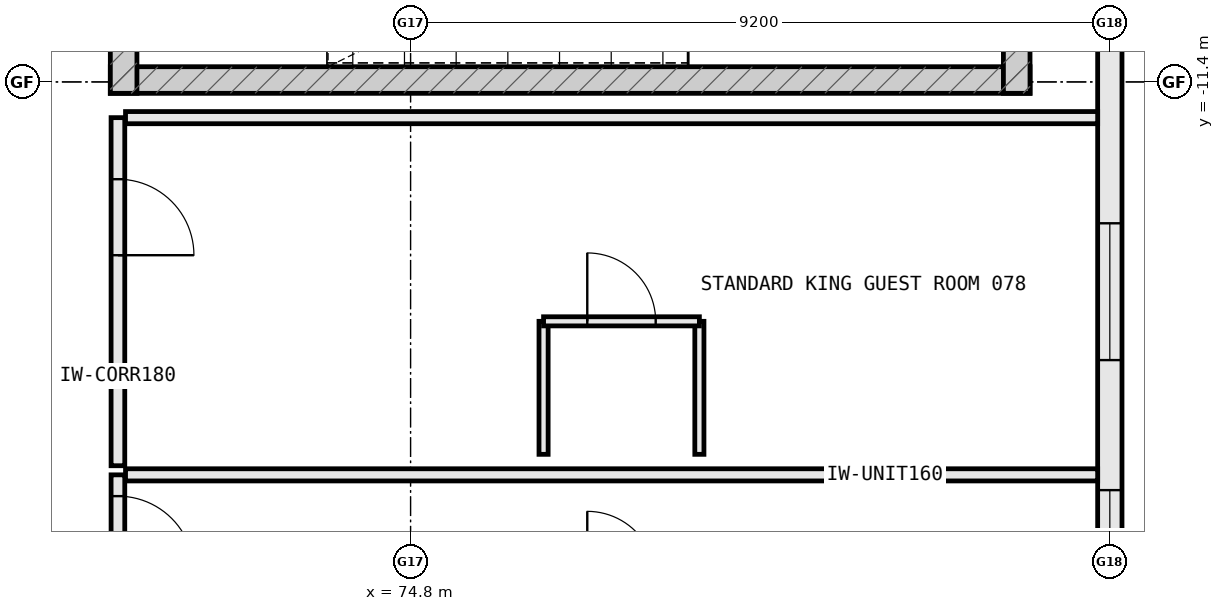
"""IFC4 building model, lengths in metres.
Left out: names, types, materials, properties, quantities, classifications, styles, units other than length and angle.
Written with IfcOpenShell. Run it as: python <this file> out.ifc"""

import sys

from ifc_helpers import new_model, si_unit, direction, frame, frame_2d, origin, place, context, subcontext, project, spatial, rectangle, extrude, element, fill, save


model = new_model("IFC4")
c1 = context("Model", 3, precision=1e-05, world=origin(), true_north=direction((0.0, 1.0)))
c2 = subcontext(c1, "Body", "Model", "MODEL_VIEW")
j1 = project(units=[si_unit("LENGTHUNIT", "METRE"), si_unit("PLANEANGLEUNIT", "RADIAN")], contexts=[c1])
p1 = place(None, origin())
s1 = spatial("IfcSite", under=j1, at=p1, CompositionType="ELEMENT")
p2 = place(p1, origin())
s2 = spatial("IfcBuilding", under=s1, at=p2, CompositionType="ELEMENT")
p3 = place(p2, frame((0.0, 0.0, 16.2)))
s3 = spatial("IfcBuildingStorey", under=s2, at=p3, CompositionType="ELEMENT", Elevation=16.2)
p4 = place(p3, frame((84.0, -18.322, 0.0), z_axis=(0.0, 0.0, 1.0), x_axis=(0.0, 1.0, 0.0)))
e1 = element("IfcWall", 1, at=p4, inside=s3, PredefinedType="STANDARD", context=c2, shape_type="SweptSolid", body=[
    extrude(rectangle(XDim=9.044, YDim=0.32, at=frame_2d((4.522, 0.0))), origin(), (0.0, 0.0, 1.0), 2.975),
])
p5 = place(p4, frame((0.201, 0.0, 0.85)))
e2 = element("IfcOpeningElement", 2, at=p5, cuts=e1, PredefinedType="OPENING", context=c2, shape_type="SweptSolid", body=[
    extrude(rectangle(XDim=1.35, YDim=1.65, at=frame_2d((0.675, 0.825))), frame((0.0, 0.172, 0.0), z_axis=(0.0, -1.0, 0.0), x_axis=(1.0, 0.0, 0.0)), (0.0, 0.0, 1.0), 0.344),
])
p6 = place(p4, frame((3.262, 0.0, 0.85)))
e3 = element("IfcOpeningElement", 3, at=p6, cuts=e1, PredefinedType="OPENING", context=c2, shape_type="SweptSolid", body=[
    extrude(rectangle(XDim=1.8, YDim=1.85, at=frame_2d((0.9, 0.925))), frame((0.0, 0.172, 0.0), z_axis=(0.0, -1.0, 0.0), x_axis=(1.0, 0.0, 0.0)), (0.0, 0.0, 1.0), 0.344),
])
p7 = place(p3, frame((70.85, -11.375, 0.0), z_axis=(0.0, 0.0, 1.0), x_axis=(1.0, 0.0, 0.0)))
e4 = element("IfcWall", 4, at=p7, inside=s3, PredefinedType="SHEAR", context=c2, shape_type="SweptSolid", body=[
    extrude(rectangle(XDim=12.1, YDim=0.35, at=frame_2d((6.05, 0.0))), origin(), (0.0, 0.0, 1.0), 3.8),
])
p8 = place(p3, frame((82.775, -11.55, 0.0), z_axis=(0.0, 0.0, 1.0), x_axis=(0.0, 1.0, 0.0)))
e5 = element("IfcWall", 5, at=p8, inside=s3, PredefinedType="SHEAR", context=c2, shape_type="SweptSolid", body=[
    extrude(rectangle(XDim=5.1, YDim=0.35, at=frame_2d((2.55, 0.0))), origin(), (0.0, 0.0, 1.0), 3.8),
])
p9 = place(p3, frame((71.025, -6.45, 0.0), z_axis=(0.0, 0.0, 1.0), x_axis=(0.0, -1.0, 0.0)))
e6 = element("IfcWall", 6, at=p9, inside=s3, PredefinedType="SHEAR", context=c2, shape_type="SweptSolid", body=[
    extrude(rectangle(XDim=5.1, YDim=0.35, at=frame_2d((2.55, 0.0))), origin(), (0.0, 0.0, 1.0), 3.8),
])
p10 = place(p9, frame((2.0, 0.0, 0.0)))
e7 = element("IfcOpeningElement", 7, at=p10, cuts=e6, PredefinedType="OPENING", context=c2, shape_type="SweptSolid", body=[
    extrude(rectangle(XDim=1.1, YDim=2.2, at=frame_2d((0.55, 1.1))), frame((0.0, 0.187, 0.0), z_axis=(0.0, -1.0, 0.0), x_axis=(1.0, 0.0, 0.0)), (0.0, 0.0, 1.0), 0.374),
])
p11 = place(p3, frame((70.95, -16.57, 0.0), z_axis=(0.0, 0.0, 1.0), x_axis=(0.0, -1.0, 0.0)))
e8 = element("IfcWall", 8, at=p11, inside=s3, PredefinedType="PARTITIONING", context=c2, shape_type="SweptSolid", body=[
    extrude(rectangle(XDim=3.28, YDim=0.18, at=frame_2d((1.64, 0.0))), origin(), (0.0, 0.0, 1.0), 3.56),
])
p12 = place(p11, frame((0.28, 0.0, 0.0)))
e9 = element("IfcOpeningElement", 9, at=p12, cuts=e8, PredefinedType="OPENING", context=c2, shape_type="SweptSolid", body=[
    extrude(rectangle(XDim=1.0, YDim=2.2, at=frame_2d((0.5, 1.1))), frame((0.0, 0.102, 0.0), z_axis=(0.0, -1.0, 0.0), x_axis=(1.0, 0.0, 0.0)), (0.0, 0.0, 1.0), 0.204),
])
p13 = place(p3, frame((71.05, -16.57, 0.0), z_axis=(0.0, 0.0, 1.0), x_axis=(1.0, 0.0, 0.0)))
e10 = element("IfcWall", 10, at=p13, inside=s3, PredefinedType="PARTITIONING", context=c2, shape_type="SweptSolid", body=[
    extrude(rectangle(XDim=12.79, YDim=0.16, at=frame_2d((6.395, 0.0))), origin(), (0.0, 0.0, 1.0), 3.56),
])
p14 = place(p3, frame((70.95, -11.87, 0.0), z_axis=(0.0, 0.0, 1.0), x_axis=(0.0, -1.0, 0.0)))
e11 = element("IfcWall", 11, at=p14, inside=s3, PredefinedType="PARTITIONING", context=c2, shape_type="SweptSolid", body=[
    extrude(rectangle(XDim=4.58, YDim=0.18, at=frame_2d((2.29, 0.0))), origin(), (0.0, 0.0, 1.0), 3.56),
])
p15 = place(p14, frame((0.81, 0.0, 0.0)))
e12 = element("IfcOpeningElement", 12, at=p15, cuts=e11, PredefinedType="OPENING", context=c2, shape_type="SweptSolid", body=[
    extrude(rectangle(XDim=1.0, YDim=2.2, at=frame_2d((0.5, 1.1))), frame((0.0, 0.102, 0.0), z_axis=(0.0, -1.0, 0.0), x_axis=(1.0, 0.0, 0.0)), (0.0, 0.0, 1.0), 0.204),
])
p16 = place(p3, frame((71.05, -11.87, 0.0), z_axis=(0.0, 0.0, 1.0), x_axis=(1.0, 0.0, 0.0)))
e13 = element("IfcWall", 13, at=p16, inside=s3, PredefinedType="PARTITIONING", context=c2, shape_type="SweptSolid", body=[
    extrude(rectangle(XDim=12.79, YDim=0.16, at=frame_2d((6.395, 0.0))), origin(), (0.0, 0.0, 1.0), 3.56),
])
for number, where, z_axis, x_axis in (
    (14, (76.55, -16.3, 0.0), (0.0, 0.0, 1.0), (0.0, 1.0, 0.0)),
    (15, (78.6, -16.3, 0.0), (0.0, 0.0, 1.0), (0.0, 1.0, 0.0)),
):
    element("IfcWall", number, at=place(p3, frame(where, z_axis=z_axis, x_axis=x_axis)), inside=s3, PredefinedType="PARTITIONING", context=c2, shape_type="SweptSolid", body=[
        extrude(rectangle(XDim=1.75, YDim=0.12, at=frame_2d((0.875, 0.0))), origin(), (0.0, 0.0, 1.0), 3.56),
    ])
p17 = place(p3, frame((76.55, -14.55, 0.0), z_axis=(0.0, 0.0, 1.0), x_axis=(1.0, 0.0, 0.0)))
e16 = element("IfcWall", 16, at=p17, inside=s3, PredefinedType="PARTITIONING", context=c2, shape_type="SweptSolid", body=[
    extrude(rectangle(XDim=2.05, YDim=0.12, at=frame_2d((1.025, 0.0))), origin(), (0.0, 0.0, 1.0), 3.56),
])
p18 = place(p17, frame((0.575, 0.0, 0.0)))
e17 = element("IfcOpeningElement", 17, at=p18, cuts=e16, PredefinedType="OPENING", context=c2, shape_type="SweptSolid", body=[
    extrude(rectangle(XDim=0.9, YDim=2.15, at=frame_2d((0.45, 1.075))), frame((0.0, 0.072, 0.0), z_axis=(0.0, -1.0, 0.0), x_axis=(1.0, 0.0, 0.0)), (0.0, 0.0, 1.0), 0.144),
])
p19 = place(p5, origin())
e18 = element("IfcWindow", 18, at=p19, inside=s3, PartitioningType="SINGLE_PANEL", PredefinedType="WINDOW", context=c2, shape_type="SweptSolid", body=[
    extrude(rectangle(XDim=1.35, YDim=1.65, at=frame_2d((0.675, 0.825))), frame((0.0, 0.03, 0.0), z_axis=(0.0, -1.0, 0.0), x_axis=(1.0, 0.0, 0.0)), (0.0, 0.0, 1.0), 0.06),
])
fill(e2, e18)
p20 = place(p6, origin())
e19 = element("IfcWindow", 19, at=p20, inside=s3, PartitioningType="SINGLE_PANEL", PredefinedType="WINDOW", context=c2, shape_type="SweptSolid", body=[
    extrude(rectangle(XDim=1.8, YDim=1.85, at=frame_2d((0.9, 0.925))), frame((0.0, 0.03, 0.0), z_axis=(0.0, -1.0, 0.0), x_axis=(1.0, 0.0, 0.0)), (0.0, 0.0, 1.0), 0.06),
])
fill(e3, e19)
p21 = place(p12, origin())
e20 = element("IfcDoor", 20, at=p21, inside=s3, OperationType="SINGLE_SWING_RIGHT", PredefinedType="DOOR", context=c2, shape_type="SweptSolid", body=[
    extrude(rectangle(XDim=1.0, YDim=2.2, at=frame_2d((0.5, 1.1))), frame((0.0, 0.025, 0.0), z_axis=(0.0, -1.0, 0.0), x_axis=(1.0, 0.0, 0.0)), (0.0, 0.0, 1.0), 0.05),
])
fill(e9, e20)
p22 = place(p15, origin())
e21 = element("IfcDoor", 21, at=p22, inside=s3, OperationType="SINGLE_SWING_RIGHT", PredefinedType="DOOR", context=c2, shape_type="SweptSolid", body=[
    extrude(rectangle(XDim=1.0, YDim=2.2, at=frame_2d((0.5, 1.1))), frame((0.0, 0.025, 0.0), z_axis=(0.0, -1.0, 0.0), x_axis=(1.0, 0.0, 0.0)), (0.0, 0.0, 1.0), 0.05),
])
fill(e12, e21)
p23 = place(p18, origin())
e22 = element("IfcDoor", 22, at=p23, inside=s3, OperationType="SINGLE_SWING_LEFT", PredefinedType="DOOR", context=c2, shape_type="SweptSolid", body=[
    extrude(rectangle(XDim=0.9, YDim=2.15, at=frame_2d((0.45, 1.075))), frame((0.0, 0.025, 0.0), z_axis=(0.0, -1.0, 0.0), x_axis=(1.0, 0.0, 0.0)), (0.0, 0.0, 1.0), 0.05),
])
fill(e17, e22)
save(model, sys.argv[1])
